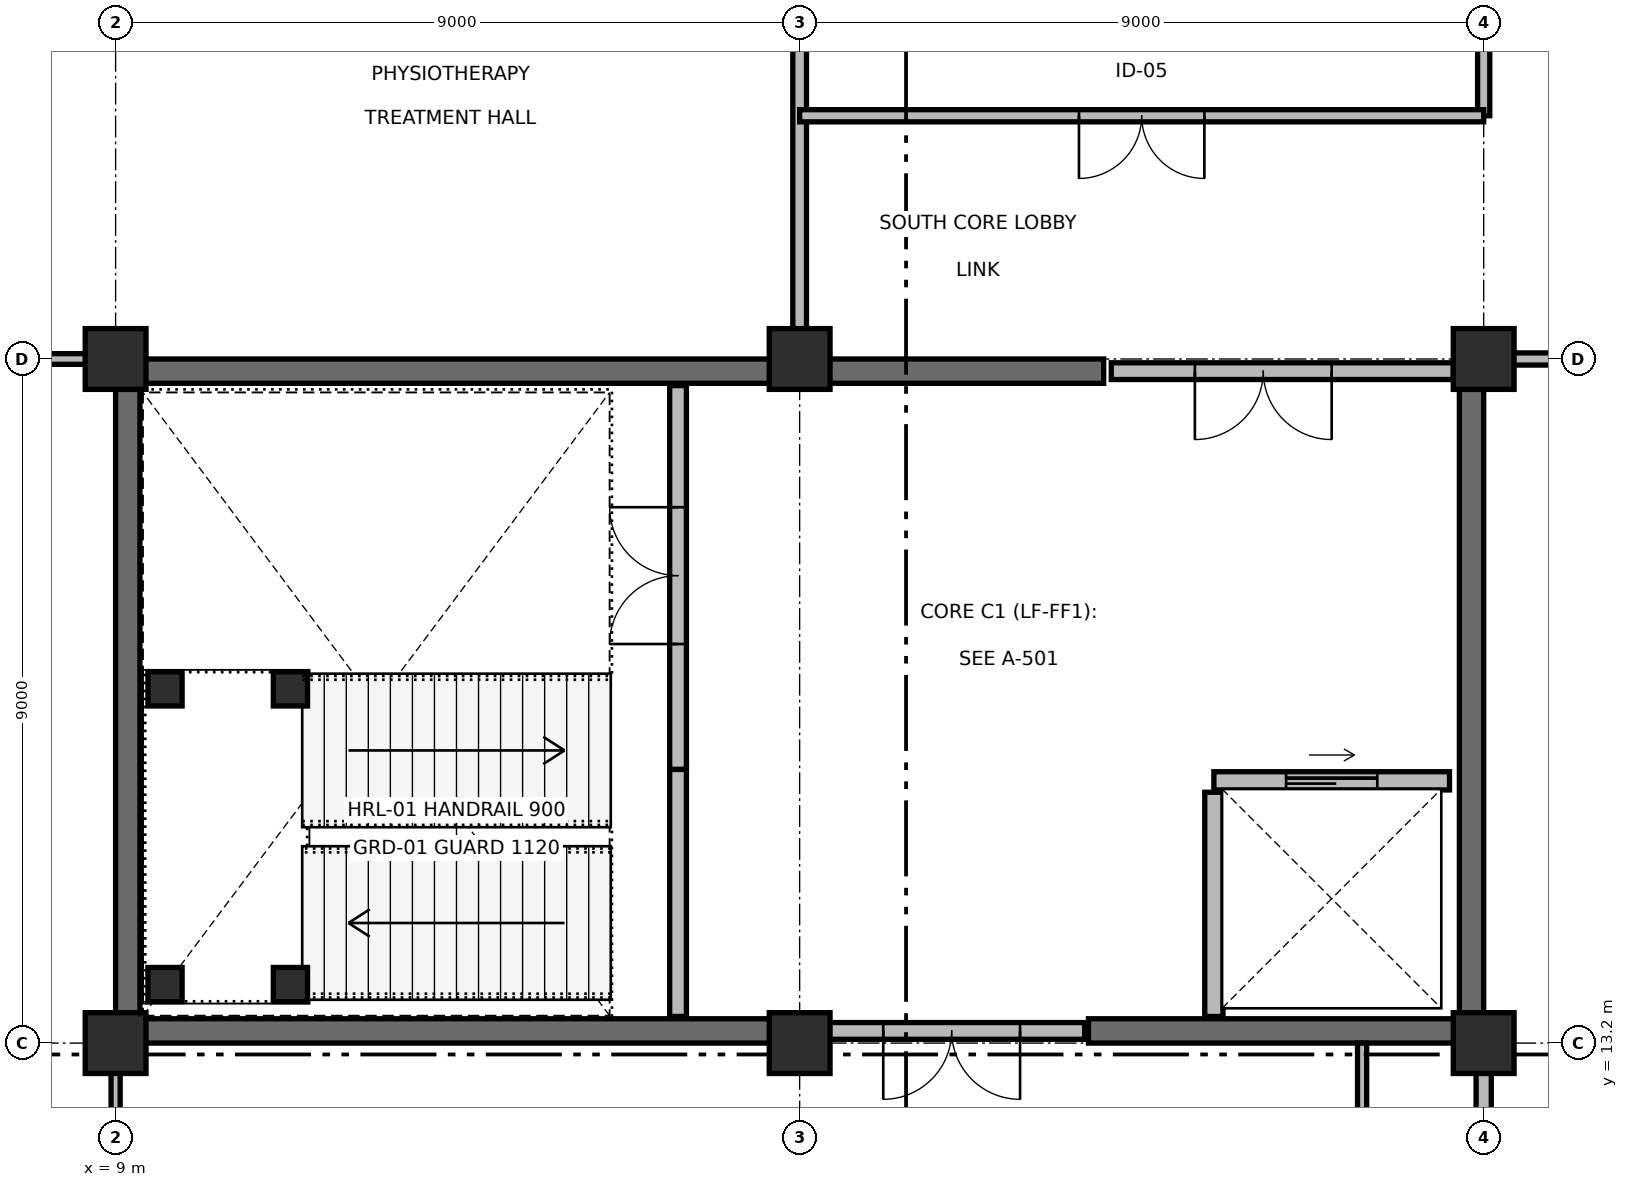
"""IFC4 building model, lengths in metres.
Left out: names, types, materials, properties, quantities, classifications, styles, units other than length and angle.
Written with IfcOpenShell. Run it as: python <this file> out.ifc"""

import sys

from ifc_helpers import new_model, si_unit, direction, frame, frame_2d, origin, origin_2d, place, context, subcontext, project, spatial, rectangle, extrude, element, fill, save


model = new_model("IFC4")
c1 = context("Model", 3, precision=1e-05, world=origin(), true_north=direction((0.0, 1.0)))
c2 = subcontext(c1, "Body", "Model", "MODEL_VIEW")
j1 = project(units=[si_unit("LENGTHUNIT", "METRE"), si_unit("PLANEANGLEUNIT", "RADIAN")], contexts=[c1])
p1 = place(None, origin())
s1 = spatial("IfcSite", under=j1, at=p1, CompositionType="ELEMENT")
p2 = place(p1, origin())
s2 = spatial("IfcBuilding", under=s1, at=p2, CompositionType="ELEMENT")
p3 = place(p2, origin())
s3 = spatial("IfcBuildingStorey", under=s2, at=p3, CompositionType="ELEMENT", Elevation=0.0)
for number, where, z_axis, x_axis in (
    (1, (9.0, 13.2, 0.0), (0.0, 0.0, 1.0), (1.0, 0.0, 0.0)),
    (2, (9.0, 22.2, 0.0), (0.0, 0.0, 1.0), (1.0, 0.0, 0.0)),
    (3, (18.0, 13.2, 0.0), (0.0, 0.0, 1.0), (1.0, 0.0, 0.0)),
    (4, (18.0, 22.2, 0.0), (0.0, 0.0, 1.0), (1.0, 0.0, 0.0)),
    (5, (27.0, 13.2, 0.0), (0.0, 0.0, 1.0), (1.0, 0.0, 0.0)),
    (6, (27.0, 22.2, 0.0), (0.0, 0.0, 1.0), (1.0, 0.0, 0.0)),
):
    element("IfcColumn", number, at=place(p3, frame(where, z_axis=z_axis, x_axis=x_axis)), inside=s3, PredefinedType="COLUMN", context=c2, shape_type="SweptSolid", body=[
        extrude(rectangle(XDim=0.8, YDim=0.8, at=origin_2d()), origin(), (0.0, 0.0, 1.0), 4.8),
    ])
p4 = place(p3, frame((9.0, 13.36, 0.0), z_axis=(0.0, 0.0, 1.0), x_axis=(1.0, 0.0, 0.0)))
e7 = element("IfcWall", 7, at=p4, inside=s3, PredefinedType="SHEAR", context=c2, shape_type="SweptSolid", body=[
    extrude(rectangle(XDim=9.2, YDim=0.32, at=frame_2d((4.6, 0.0))), origin(), (0.0, 0.0, 1.0), 4.8),
])
p5 = place(p3, frame((21.8, 13.36, 0.0), z_axis=(0.0, 0.0, 1.0), x_axis=(1.0, 0.0, 0.0)))
e8 = element("IfcWall", 8, at=p5, inside=s3, PredefinedType="SHEAR", context=c2, shape_type="SweptSolid", body=[
    extrude(rectangle(XDim=5.2, YDim=0.32, at=frame_2d((2.6, 0.0))), origin(), (0.0, 0.0, 1.0), 4.8),
])
p6 = place(p3, frame((9.0, 22.04, 0.0), z_axis=(0.0, 0.0, 1.0), x_axis=(1.0, 0.0, 0.0)))
e9 = element("IfcWall", 9, at=p6, inside=s3, PredefinedType="SHEAR", context=c2, shape_type="SweptSolid", body=[
    extrude(rectangle(XDim=13.0, YDim=0.32, at=frame_2d((6.5, 0.0))), origin(), (0.0, 0.0, 1.0), 4.8),
])
p7 = place(p3, frame((9.16, 13.52, 0.0), z_axis=(0.0, 0.0, 1.0), x_axis=(0.0, 1.0, 0.0)))
e10 = element("IfcWall", 10, at=p7, inside=s3, PredefinedType="SHEAR", context=c2, shape_type="SweptSolid", body=[
    extrude(rectangle(XDim=8.36, YDim=0.32, at=frame_2d((4.18, 0.0))), origin(), (0.0, 0.0, 1.0), 4.8),
])
p8 = place(p3, frame((26.84, 13.52, 0.0), z_axis=(0.0, 0.0, 1.0), x_axis=(0.0, 1.0, 0.0)))
e11 = element("IfcWall", 11, at=p8, inside=s3, PredefinedType="SHEAR", context=c2, shape_type="SweptSolid", body=[
    extrude(rectangle(XDim=8.48, YDim=0.32, at=frame_2d((4.24, 0.0))), origin(), (0.0, 0.0, 1.0), 4.8),
])
p9 = place(p3, frame((16.4, 21.85, 0.0), z_axis=(0.0, 0.0, 1.0), x_axis=(0.0, -1.0, 0.0)))
e12 = element("IfcWall", 12, at=p9, inside=s3, PredefinedType="PARTITIONING", context=c2, shape_type="SweptSolid", body=[
    extrude(rectangle(XDim=5.05, YDim=0.22, at=frame_2d((2.525, 0.0))), origin(), (0.0, 0.0, 1.0), 3.835),
])
p10 = place(p9, frame((1.6, 0.0, 0.0)))
e13 = element("IfcOpeningElement", 13, at=p10, cuts=e12, PredefinedType="OPENING", context=c2, shape_type="SweptSolid", body=[
    extrude(rectangle(XDim=1.8, YDim=2.2, at=frame_2d((0.9, 1.1))), frame((0.0, 0.12, 0.0), z_axis=(0.0, -1.0, 0.0), x_axis=(1.0, 0.0, 0.0)), (0.0, 0.0, 1.0), 0.24),
])
p11 = place(p3, frame((16.4, 13.55, 0.0), z_axis=(0.0, 0.0, 1.0), x_axis=(0.0, 1.0, 0.0)))
e14 = element("IfcWall", 14, at=p11, inside=s3, PredefinedType="PARTITIONING", context=c2, shape_type="SweptSolid", body=[
    extrude(rectangle(XDim=3.25, YDim=0.22, at=frame_2d((1.625, 0.0))), origin(), (0.0, 0.0, 1.0), 3.835),
])
p12 = place(p3, frame((23.45, 16.65, 0.0), z_axis=(0.0, 0.0, 1.0), x_axis=(1.0, 0.0, 0.0)))
e15 = element("IfcWall", 15, at=p12, inside=s3, PredefinedType="SOLIDWALL", context=c2, shape_type="SweptSolid", body=[
    extrude(rectangle(XDim=3.1, YDim=0.24, at=frame_2d((1.55, 0.0))), origin(), (0.0, 0.0, 1.0), 4.505),
])
p13 = place(p12, frame((0.95, 0.0, 0.0)))
e16 = element("IfcOpeningElement", 16, at=p13, cuts=e15, PredefinedType="OPENING", context=c2, shape_type="SweptSolid", body=[
    extrude(rectangle(XDim=1.2, YDim=2.2, at=frame_2d((0.6, 1.1))), frame((0.0, 0.13, 0.0), z_axis=(0.0, -1.0, 0.0), x_axis=(1.0, 0.0, 0.0)), (0.0, 0.0, 1.0), 0.26),
])
p14 = place(p3, frame((23.45, 13.55, 0.0), z_axis=(0.0, 0.0, 1.0), x_axis=(0.0, 1.0, 0.0)))
e17 = element("IfcWall", 17, at=p14, inside=s3, PredefinedType="SOLIDWALL", context=c2, shape_type="SweptSolid", body=[
    extrude(rectangle(XDim=2.95, YDim=0.24, at=frame_2d((1.475, 0.0))), origin(), (0.0, 0.0, 1.0), 3.835),
])
p15 = place(p3, frame((22.1, 22.04, 0.0), z_axis=(0.0, 0.0, 1.0), x_axis=(1.0, 0.0, 0.0)))
e18 = element("IfcWall", 18, at=p15, inside=s3, PredefinedType="PARTITIONING", context=c2, shape_type="SweptSolid", body=[
    extrude(rectangle(XDim=4.5, YDim=0.22, at=frame_2d((2.25, 0.0))), origin(), (0.0, 0.0, 1.0), 3.835),
])
p16 = place(p15, frame((1.1, 0.0, 0.0)))
e19 = element("IfcOpeningElement", 19, at=p16, cuts=e18, PredefinedType="OPENING", context=c2, shape_type="SweptSolid", body=[
    extrude(rectangle(XDim=1.8, YDim=2.2, at=frame_2d((0.9, 1.1))), frame((0.0, 0.12, 0.0), z_axis=(0.0, -1.0, 0.0), x_axis=(1.0, 0.0, 0.0)), (0.0, 0.0, 1.0), 0.24),
])
p17 = place(p3, frame((18.25, 13.36, 0.0), z_axis=(0.0, 0.0, 1.0), x_axis=(1.0, 0.0, 0.0)))
e20 = element("IfcWall", 20, at=p17, inside=s3, PredefinedType="PARTITIONING", context=c2, shape_type="SweptSolid", body=[
    extrude(rectangle(XDim=3.5, YDim=0.22, at=frame_2d((1.75, 0.0))), origin(), (0.0, 0.0, 1.0), 3.835),
])
p18 = place(p17, frame((0.85, 0.0, 0.0)))
e21 = element("IfcOpeningElement", 21, at=p18, cuts=e20, PredefinedType="OPENING", context=c2, shape_type="SweptSolid", body=[
    extrude(rectangle(XDim=1.8, YDim=2.2, at=frame_2d((0.9, 1.1))), frame((0.0, 0.12, 0.0), z_axis=(0.0, -1.0, 0.0), x_axis=(1.0, 0.0, 0.0)), (0.0, 0.0, 1.0), 0.24),
])
p19 = place(p3, frame((27.0, 22.2, 0.0), z_axis=(0.0, 0.0, 1.0), x_axis=(1.0, 0.0, 0.0)))
e22 = element("IfcWall", 22, at=p19, inside=s3, PredefinedType="PARTITIONING", context=c2, shape_type="SweptSolid", body=[
    extrude(rectangle(XDim=18.0, YDim=0.16, at=frame_2d((9.0, 0.0))), origin(), (0.0, 0.0, 1.0), 3.785),
])
p20 = place(p19, frame((4.49, 0.0, 0.0)))
e23 = element("IfcOpeningElement", 23, at=p20, cuts=e22, PredefinedType="OPENING", context=c2, shape_type="SweptSolid", body=[
    extrude(rectangle(XDim=1.1, YDim=2.15, at=frame_2d((0.55, 1.075))), frame((0.0, 0.09, 0.0), z_axis=(0.0, -1.0, 0.0), x_axis=(1.0, 0.0, 0.0)), (0.0, 0.0, 1.0), 0.18),
])
p21 = place(p3, frame((0.0, 22.2, 0.0), z_axis=(0.0, 0.0, 1.0), x_axis=(1.0, 0.0, 0.0)))
e24 = element("IfcWall", 24, at=p21, inside=s3, PredefinedType="PARTITIONING", context=c2, shape_type="SweptSolid", body=[
    extrude(rectangle(XDim=9.0, YDim=0.14, at=frame_2d((4.5, 0.0))), origin(), (0.0, 0.0, 1.0), 3.835),
])
p22 = place(p21, frame((4.025, 0.0, 0.0)))
e25 = element("IfcOpeningElement", 25, at=p22, cuts=e24, PredefinedType="OPENING", context=c2, shape_type="SweptSolid", body=[
    extrude(rectangle(XDim=0.95, YDim=2.1, at=frame_2d((0.475, 1.05))), frame((0.0, 0.08, 0.0), z_axis=(0.0, -1.0, 0.0), x_axis=(1.0, 0.0, 0.0)), (0.0, 0.0, 1.0), 0.16),
])
p23 = place(p3, frame((25.4, 4.2, 0.0), z_axis=(0.0, 0.0, 1.0), x_axis=(0.0, 1.0, 0.0)))
e26 = element("IfcWall", 26, at=p23, inside=s3, PredefinedType="PARTITIONING", context=c2, shape_type="SweptSolid", body=[
    extrude(rectangle(XDim=9.0, YDim=0.12, at=frame_2d((4.5, 0.0))), origin(), (0.0, 0.0, 1.0), 3.785),
])
p24 = place(p23, frame((4.05, 0.0, 0.0)))
e27 = element("IfcOpeningElement", 27, at=p24, cuts=e26, PredefinedType="OPENING", context=c2, shape_type="SweptSolid", body=[
    extrude(rectangle(XDim=0.9, YDim=2.1, at=frame_2d((0.45, 1.05))), frame((0.0, 0.07, 0.0), z_axis=(0.0, -1.0, 0.0), x_axis=(1.0, 0.0, 0.0)), (0.0, 0.0, 1.0), 0.14),
])
p25 = place(p3, frame((9.0, 4.2, 0.0), z_axis=(0.0, 0.0, 1.0), x_axis=(0.0, 1.0, 0.0)))
e28 = element("IfcWall", 28, at=p25, inside=s3, PredefinedType="PARTITIONING", context=c2, shape_type="SweptSolid", body=[
    extrude(rectangle(XDim=9.0, YDim=0.12, at=frame_2d((4.5, 0.0))), origin(), (0.0, 0.0, 1.0), 3.835),
])
p26 = place(p3, frame((27.0, 4.2, 0.0), z_axis=(0.0, 0.0, 1.0), x_axis=(0.0, 1.0, 0.0)))
e29 = element("IfcWall", 29, at=p26, inside=s3, PredefinedType="PARTITIONING", context=c2, shape_type="SweptSolid", body=[
    extrude(rectangle(XDim=9.0, YDim=0.2, at=frame_2d((4.5, 0.0))), origin(), (0.0, 0.0, 1.0), 3.835),
])
p27 = place(p26, frame((3.975, 0.0, 0.0)))
e30 = element("IfcOpeningElement", 30, at=p27, cuts=e29, PredefinedType="OPENING", context=c2, shape_type="SweptSolid", body=[
    extrude(rectangle(XDim=1.05, YDim=2.15, at=frame_2d((0.525, 1.075))), frame((0.0, 0.11, 0.0), z_axis=(0.0, -1.0, 0.0), x_axis=(1.0, 0.0, 0.0)), (0.0, 0.0, 1.0), 0.22),
])
p28 = place(p3, frame((18.0, 22.2, 0.0), z_axis=(0.0, 0.0, 1.0), x_axis=(0.0, 1.0, 0.0)))
e31 = element("IfcWall", 31, at=p28, inside=s3, PredefinedType="PARTITIONING", context=c2, shape_type="SweptSolid", body=[
    extrude(rectangle(XDim=18.6, YDim=0.18, at=frame_2d((9.3, 0.0))), origin(), (0.0, 0.0, 1.0), 2.18),
])
p29 = place(p3, frame((27.0, 25.4, 0.0), z_axis=(0.0, 0.0, 1.0), x_axis=(0.0, 1.0, 0.0)))
e32 = element("IfcWall", 32, at=p29, inside=s3, PredefinedType="PARTITIONING", context=c2, shape_type="SweptSolid", body=[
    extrude(rectangle(XDim=15.4, YDim=0.16, at=frame_2d((7.7, 0.0))), origin(), (0.0, 0.0, 1.0), 2.18),
])
p30 = place(p3, frame((18.0, 25.4, 0.0), z_axis=(0.0, 0.0, 1.0), x_axis=(1.0, 0.0, 0.0)))
e33 = element("IfcWall", 33, at=p30, inside=s3, PredefinedType="PARTITIONING", context=c2, shape_type="SweptSolid", body=[
    extrude(rectangle(XDim=9.0, YDim=0.16, at=frame_2d((4.5, 0.0))), origin(), (0.0, 0.0, 1.0), 3.045),
])
p31 = place(p30, frame((3.675, 0.0, 0.0)))
e34 = element("IfcOpeningElement", 34, at=p31, cuts=e33, PredefinedType="OPENING", context=c2, shape_type="SweptSolid", body=[
    extrude(rectangle(XDim=1.65, YDim=2.2, at=frame_2d((0.825, 1.1))), frame((0.0, 0.09, 0.0), z_axis=(0.0, -1.0, 0.0), x_axis=(1.0, 0.0, 0.0)), (0.0, 0.0, 1.0), 0.18),
])
for number, where, z_axis, x_axis in (
    (35, (9.65, 13.97, 0.0), (0.0, 0.0, 1.0), (1.0, 0.0, 0.0)),
    (36, (11.3, 13.97, 0.0), (0.0, 0.0, 1.0), (1.0, 0.0, 0.0)),
    (37, (9.65, 17.86, 0.0), (0.0, 0.0, 1.0), (1.0, 0.0, 0.0)),
    (38, (11.3, 17.86, 0.0), (0.0, 0.0, 1.0), (1.0, 0.0, 0.0)),
):
    element("IfcColumn", number, at=place(p3, frame(where, z_axis=z_axis, x_axis=x_axis)), inside=s3, PredefinedType="COLUMN", context=c2, shape_type="SweptSolid", body=[
        extrude(rectangle(XDim=0.45, YDim=0.45, at=origin_2d()), origin(), (0.0, 0.0, 1.0), 4.8),
    ])
p32 = place(p10, origin())
e39 = element("IfcDoor", 39, at=p32, inside=s3, OperationType="DOUBLE_DOOR_SINGLE_SWING", PredefinedType="DOOR", context=c2, shape_type="SweptSolid", body=[
    extrude(rectangle(XDim=1.8, YDim=2.2, at=frame_2d((0.9, 1.1))), frame((0.0, 0.025, 0.0), z_axis=(0.0, -1.0, 0.0), x_axis=(1.0, 0.0, 0.0)), (0.0, 0.0, 1.0), 0.05),
])
fill(e13, e39)
p33 = place(p13, origin())
e40 = element("IfcDoor", 40, at=p33, inside=s3, OperationType="DOUBLE_DOOR_SLIDING", PredefinedType="DOOR", context=c2, shape_type="SweptSolid", body=[
    extrude(rectangle(XDim=1.2, YDim=2.2, at=frame_2d((0.6, 1.1))), frame((0.0, 0.025, 0.0), z_axis=(0.0, -1.0, 0.0), x_axis=(1.0, 0.0, 0.0)), (0.0, 0.0, 1.0), 0.05),
])
fill(e16, e40)
p34 = place(p16, origin())
e41 = element("IfcDoor", 41, at=p34, inside=s3, OperationType="DOUBLE_DOOR_SINGLE_SWING", PredefinedType="DOOR", context=c2, shape_type="SweptSolid", body=[
    extrude(rectangle(XDim=1.8, YDim=2.2, at=frame_2d((0.9, 1.1))), frame((0.0, 0.025, 0.0), z_axis=(0.0, -1.0, 0.0), x_axis=(1.0, 0.0, 0.0)), (0.0, 0.0, 1.0), 0.05),
])
fill(e19, e41)
p35 = place(p18, origin())
e42 = element("IfcDoor", 42, at=p35, inside=s3, OperationType="DOUBLE_DOOR_SINGLE_SWING", PredefinedType="DOOR", context=c2, shape_type="SweptSolid", body=[
    extrude(rectangle(XDim=1.8, YDim=2.2, at=frame_2d((0.9, 1.1))), frame((0.0, 0.025, 0.0), z_axis=(0.0, -1.0, 0.0), x_axis=(1.0, 0.0, 0.0)), (0.0, 0.0, 1.0), 0.05),
])
fill(e21, e42)
p36 = place(p31, origin())
e43 = element("IfcDoor", 43, at=p36, inside=s3, OperationType="DOUBLE_DOOR_SINGLE_SWING", PredefinedType="DOOR", context=c2, shape_type="SweptSolid", body=[
    extrude(rectangle(XDim=1.65, YDim=2.2, at=frame_2d((0.825, 1.1))), frame((0.0, 0.025, 0.0), z_axis=(0.0, -1.0, 0.0), x_axis=(1.0, 0.0, 0.0)), (0.0, 0.0, 1.0), 0.05),
])
fill(e34, e43)
save(model, sys.argv[1])
